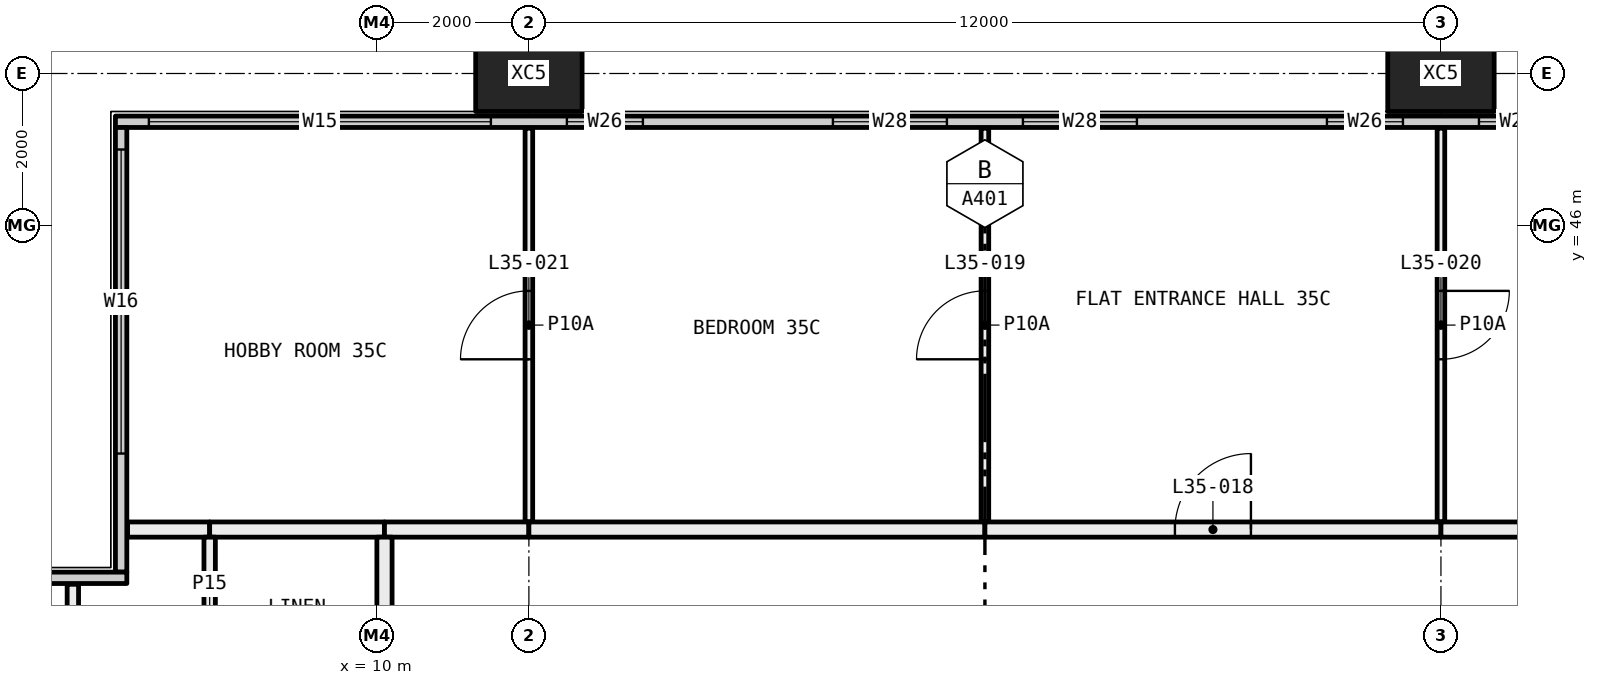
"""IFC4 building model, lengths in metres.
Left out: names, types, materials, properties, quantities, classifications, styles, units other than length and angle.
Written with IfcOpenShell. Run it as: python <this file> out.ifc"""

import sys

from ifc_helpers import new_model, si_unit, direction, frame, frame_2d, origin, origin_2d, place, context, subcontext, project, spatial, rectangle, hollow_rectangle, extrude, element, fill, save


model = new_model("IFC4")
c1 = context("Model", 3, precision=1e-05, world=origin(), true_north=direction((0.0, 1.0)))
c2 = subcontext(c1, "Body", "Model", "MODEL_VIEW")
j1 = project(units=[si_unit("LENGTHUNIT", "METRE"), si_unit("PLANEANGLEUNIT", "RADIAN")], contexts=[c1])
p1 = place(None, origin())
s1 = spatial("IfcSite", under=j1, at=p1, CompositionType="ELEMENT")
p2 = place(p1, origin())
s2 = spatial("IfcBuilding", under=s1, at=p2, CompositionType="ELEMENT")
p3 = place(p2, frame((0.0, 0.0, 134.55)))
s3 = spatial("IfcBuildingStorey", under=s2, at=p3, CompositionType="ELEMENT", Elevation=134.55)
for number, where, z_axis, x_axis in (
    (1, (12.0, 48.0, -0.4), (0.0, 0.0, 1.0), (1.0, 0.0, 0.0)),
    (2, (24.0, 48.0, -0.4), (0.0, 0.0, 1.0), (1.0, 0.0, 0.0)),
):
    element("IfcColumn", number, at=place(p3, frame(where, z_axis=z_axis, x_axis=x_axis)), inside=s3, PredefinedType="COLUMN", context=c2, shape_type="SweptSolid", body=[
        extrude(hollow_rectangle(XDim=1.4, YDim=1.0, WallThickness=0.055, at=origin_2d()), origin(), (0.0, 0.0, 1.0), 3.45),
    ])
p4 = place(p3, frame((6.56, 47.365, 0.0), z_axis=(0.0, 0.0, 1.0), x_axis=(1.0, 0.0, 0.0)))
e3 = element("IfcWall", 3, at=p4, inside=s3, PredefinedType="ELEMENTEDWALL", context=c2, shape_type="SweptSolid", body=[
    extrude(rectangle(XDim=58.88, YDim=0.15, at=frame_2d((29.44, 0.0))), origin(), (0.0, 0.0, 1.0), 3.05),
])
p5 = place(p4, frame((0.44, 0.0, 0.45)))
e4 = element("IfcOpeningElement", 4, at=p5, cuts=e3, PredefinedType="OPENING", context=c2, shape_type="SweptSolid", body=[
    extrude(rectangle(XDim=4.5, YDim=2.55, at=frame_2d((2.25, 1.275))), frame((0.0, 0.085, 0.0), z_axis=(0.0, -1.0, 0.0), x_axis=(1.0, 0.0, 0.0)), (0.0, 0.0, 1.0), 0.17),
])
p6 = place(p4, frame((5.94, 0.0, 0.45)))
e5 = element("IfcOpeningElement", 5, at=p6, cuts=e3, PredefinedType="OPENING", context=c2, shape_type="SweptSolid", body=[
    extrude(rectangle(XDim=1.0, YDim=2.55, at=frame_2d((0.5, 1.275))), frame((0.0, 0.085, 0.0), z_axis=(0.0, -1.0, 0.0), x_axis=(1.0, 0.0, 0.0)), (0.0, 0.0, 1.0), 0.17),
])
p7 = place(p4, frame((9.44, 0.0, 0.45)))
e6 = element("IfcOpeningElement", 6, at=p7, cuts=e3, PredefinedType="OPENING", context=c2, shape_type="SweptSolid", body=[
    extrude(rectangle(XDim=1.5, YDim=2.55, at=frame_2d((0.75, 1.275))), frame((0.0, 0.085, 0.0), z_axis=(0.0, -1.0, 0.0), x_axis=(1.0, 0.0, 0.0)), (0.0, 0.0, 1.0), 0.17),
])
p8 = place(p4, frame((11.94, 0.0, 0.45)))
e7 = element("IfcOpeningElement", 7, at=p8, cuts=e3, PredefinedType="OPENING", context=c2, shape_type="SweptSolid", body=[
    extrude(rectangle(XDim=1.5, YDim=2.55, at=frame_2d((0.75, 1.275))), frame((0.0, 0.085, 0.0), z_axis=(0.0, -1.0, 0.0), x_axis=(1.0, 0.0, 0.0)), (0.0, 0.0, 1.0), 0.17),
])
p9 = place(p4, frame((15.94, 0.0, 0.45)))
e8 = element("IfcOpeningElement", 8, at=p9, cuts=e3, PredefinedType="OPENING", context=c2, shape_type="SweptSolid", body=[
    extrude(rectangle(XDim=1.0, YDim=2.55, at=frame_2d((0.5, 1.275))), frame((0.0, 0.085, 0.0), z_axis=(0.0, -1.0, 0.0), x_axis=(1.0, 0.0, 0.0)), (0.0, 0.0, 1.0), 0.17),
])
p10 = place(p4, frame((17.94, 0.0, 0.45)))
e9 = element("IfcOpeningElement", 9, at=p10, cuts=e3, PredefinedType="OPENING", context=c2, shape_type="SweptSolid", body=[
    extrude(rectangle(XDim=1.0, YDim=2.55, at=frame_2d((0.5, 1.275))), frame((0.0, 0.085, 0.0), z_axis=(0.0, -1.0, 0.0), x_axis=(1.0, 0.0, 0.0)), (0.0, 0.0, 1.0), 0.17),
])
p11 = place(p4, frame((21.44, 0.0, 0.45)))
e10 = element("IfcOpeningElement", 10, at=p11, cuts=e3, PredefinedType="OPENING", context=c2, shape_type="SweptSolid", body=[
    extrude(rectangle(XDim=1.5, YDim=2.55, at=frame_2d((0.75, 1.275))), frame((0.0, 0.085, 0.0), z_axis=(0.0, -1.0, 0.0), x_axis=(1.0, 0.0, 0.0)), (0.0, 0.0, 1.0), 0.17),
])
p12 = place(p4, frame((23.94, 0.0, 0.45)))
e11 = element("IfcOpeningElement", 11, at=p12, cuts=e3, PredefinedType="OPENING", context=c2, shape_type="SweptSolid", body=[
    extrude(rectangle(XDim=1.5, YDim=2.55, at=frame_2d((0.75, 1.275))), frame((0.0, 0.085, 0.0), z_axis=(0.0, -1.0, 0.0), x_axis=(1.0, 0.0, 0.0)), (0.0, 0.0, 1.0), 0.17),
])
p13 = place(p4, frame((27.94, 0.0, 0.45)))
e12 = element("IfcOpeningElement", 12, at=p13, cuts=e3, PredefinedType="OPENING", context=c2, shape_type="SweptSolid", body=[
    extrude(rectangle(XDim=1.0, YDim=2.55, at=frame_2d((0.5, 1.275))), frame((0.0, 0.085, 0.0), z_axis=(0.0, -1.0, 0.0), x_axis=(1.0, 0.0, 0.0)), (0.0, 0.0, 1.0), 0.17),
])
p14 = place(p4, frame((29.94, 0.0, 0.45)))
e13 = element("IfcOpeningElement", 13, at=p14, cuts=e3, PredefinedType="OPENING", context=c2, shape_type="SweptSolid", body=[
    extrude(rectangle(XDim=1.0, YDim=2.55, at=frame_2d((0.5, 1.275))), frame((0.0, 0.085, 0.0), z_axis=(0.0, -1.0, 0.0), x_axis=(1.0, 0.0, 0.0)), (0.0, 0.0, 1.0), 0.17),
])
p15 = place(p4, frame((33.44, 0.0, 0.45)))
e14 = element("IfcOpeningElement", 14, at=p15, cuts=e3, PredefinedType="OPENING", context=c2, shape_type="SweptSolid", body=[
    extrude(rectangle(XDim=1.5, YDim=2.55, at=frame_2d((0.75, 1.275))), frame((0.0, 0.085, 0.0), z_axis=(0.0, -1.0, 0.0), x_axis=(1.0, 0.0, 0.0)), (0.0, 0.0, 1.0), 0.17),
])
p16 = place(p4, frame((35.94, 0.0, 0.45)))
e15 = element("IfcOpeningElement", 15, at=p16, cuts=e3, PredefinedType="OPENING", context=c2, shape_type="SweptSolid", body=[
    extrude(rectangle(XDim=1.5, YDim=2.55, at=frame_2d((0.75, 1.275))), frame((0.0, 0.085, 0.0), z_axis=(0.0, -1.0, 0.0), x_axis=(1.0, 0.0, 0.0)), (0.0, 0.0, 1.0), 0.17),
])
p17 = place(p4, frame((39.94, 0.0, 0.45)))
e16 = element("IfcOpeningElement", 16, at=p17, cuts=e3, PredefinedType="OPENING", context=c2, shape_type="SweptSolid", body=[
    extrude(rectangle(XDim=1.0, YDim=2.55, at=frame_2d((0.5, 1.275))), frame((0.0, 0.085, 0.0), z_axis=(0.0, -1.0, 0.0), x_axis=(1.0, 0.0, 0.0)), (0.0, 0.0, 1.0), 0.17),
])
p18 = place(p4, frame((41.94, 0.0, 0.45)))
e17 = element("IfcOpeningElement", 17, at=p18, cuts=e3, PredefinedType="OPENING", context=c2, shape_type="SweptSolid", body=[
    extrude(rectangle(XDim=1.0, YDim=2.55, at=frame_2d((0.5, 1.275))), frame((0.0, 0.085, 0.0), z_axis=(0.0, -1.0, 0.0), x_axis=(1.0, 0.0, 0.0)), (0.0, 0.0, 1.0), 0.17),
])
p19 = place(p4, frame((45.44, 0.0, 0.45)))
e18 = element("IfcOpeningElement", 18, at=p19, cuts=e3, PredefinedType="OPENING", context=c2, shape_type="SweptSolid", body=[
    extrude(rectangle(XDim=1.5, YDim=2.55, at=frame_2d((0.75, 1.275))), frame((0.0, 0.085, 0.0), z_axis=(0.0, -1.0, 0.0), x_axis=(1.0, 0.0, 0.0)), (0.0, 0.0, 1.0), 0.17),
])
p20 = place(p4, frame((47.94, 0.0, 0.45)))
e19 = element("IfcOpeningElement", 19, at=p20, cuts=e3, PredefinedType="OPENING", context=c2, shape_type="SweptSolid", body=[
    extrude(rectangle(XDim=1.5, YDim=2.55, at=frame_2d((0.75, 1.275))), frame((0.0, 0.085, 0.0), z_axis=(0.0, -1.0, 0.0), x_axis=(1.0, 0.0, 0.0)), (0.0, 0.0, 1.0), 0.17),
])
p21 = place(p4, frame((51.94, 0.0, 0.45)))
e20 = element("IfcOpeningElement", 20, at=p21, cuts=e3, PredefinedType="OPENING", context=c2, shape_type="SweptSolid", body=[
    extrude(rectangle(XDim=1.0, YDim=2.55, at=frame_2d((0.5, 1.275))), frame((0.0, 0.085, 0.0), z_axis=(0.0, -1.0, 0.0), x_axis=(1.0, 0.0, 0.0)), (0.0, 0.0, 1.0), 0.17),
])
p22 = place(p4, frame((53.94, 0.0, 0.45)))
e21 = element("IfcOpeningElement", 21, at=p22, cuts=e3, PredefinedType="OPENING", context=c2, shape_type="SweptSolid", body=[
    extrude(rectangle(XDim=4.5, YDim=2.55, at=frame_2d((2.25, 1.275))), frame((0.0, 0.085, 0.0), z_axis=(0.0, -1.0, 0.0), x_axis=(1.0, 0.0, 0.0)), (0.0, 0.0, 1.0), 0.17),
])
p23 = place(p3, frame((6.635, 41.44, 0.0), z_axis=(0.0, 0.0, 1.0), x_axis=(0.0, 1.0, 0.0)))
e22 = element("IfcWall", 22, at=p23, inside=s3, PredefinedType="ELEMENTEDWALL", context=c2, shape_type="SweptSolid", body=[
    extrude(rectangle(XDim=5.85, YDim=0.15, at=frame_2d((2.925, 0.0))), origin(), (0.0, 0.0, 1.0), 3.05),
])
p24 = place(p23, frame((1.56, 0.0, 0.45)))
e23 = element("IfcOpeningElement", 23, at=p24, cuts=e22, PredefinedType="OPENING", context=c2, shape_type="SweptSolid", body=[
    extrude(rectangle(XDim=4.0, YDim=2.55, at=frame_2d((2.0, 1.275))), frame((0.0, 0.085, 0.0), z_axis=(0.0, -1.0, 0.0), x_axis=(1.0, 0.0, 0.0)), (0.0, 0.0, 1.0), 0.17),
])
p25 = place(p3, frame((0.56, 41.365, 0.0), z_axis=(0.0, 0.0, 1.0), x_axis=(1.0, 0.0, 0.0)))
e24 = element("IfcWall", 24, at=p25, inside=s3, PredefinedType="ELEMENTEDWALL", context=c2, shape_type="SweptSolid", body=[
    extrude(rectangle(XDim=6.15, YDim=0.15, at=frame_2d((3.075, 0.0))), origin(), (0.0, 0.0, 1.0), 3.05),
])
p26 = place(p25, frame((0.44, 0.0, 0.45)))
e25 = element("IfcOpeningElement", 25, at=p26, cuts=e24, PredefinedType="OPENING", context=c2, shape_type="SweptSolid", body=[
    extrude(rectangle(XDim=4.0, YDim=2.55, at=frame_2d((2.0, 1.275))), frame((0.0, 0.085, 0.0), z_axis=(0.0, -1.0, 0.0), x_axis=(1.0, 0.0, 0.0)), (0.0, 0.0, 1.0), 0.17),
])
p27 = place(p3, frame((12.0, 42.1, 0.0), z_axis=(0.0, 0.0, 1.0), x_axis=(0.0, 1.0, 0.0)))
e26 = element("IfcWall", 26, at=p27, inside=s3, PredefinedType="PARTITIONING", context=c2, shape_type="SweptSolid", body=[
    extrude(rectangle(XDim=5.18, YDim=0.1, at=frame_2d((2.59, 0.0))), origin(), (0.0, 0.0, 1.0), 3.05),
])
p28 = place(p27, frame((2.14, 0.0, 0.0)))
e27 = element("IfcOpeningElement", 27, at=p28, cuts=e26, PredefinedType="OPENING", context=c2, shape_type="SweptSolid", body=[
    extrude(rectangle(XDim=0.9, YDim=2.1, at=frame_2d((0.45, 1.05))), frame((0.0, 0.06, 0.0), z_axis=(0.0, -1.0, 0.0), x_axis=(1.0, 0.0, 0.0)), (0.0, 0.0, 1.0), 0.12),
])
p29 = place(p3, frame((6.72, 42.0, 0.0), z_axis=(0.0, 0.0, 1.0), x_axis=(1.0, 0.0, 0.0)))
e28 = element("IfcWall", 28, at=p29, inside=s3, PredefinedType="PARTITIONING", context=c2, shape_type="SweptSolid", body=[
    extrude(rectangle(XDim=1.08, YDim=0.2, at=frame_2d((0.54, 0.0))), origin(), (0.0, 0.0, 1.0), 3.05),
])
p30 = place(p3, frame((7.8, 42.0, 0.0), z_axis=(0.0, 0.0, 1.0), x_axis=(1.0, 0.0, 0.0)))
e29 = element("IfcWall", 29, at=p30, inside=s3, PredefinedType="PARTITIONING", context=c2, shape_type="SweptSolid", body=[
    extrude(rectangle(XDim=2.3, YDim=0.2, at=frame_2d((1.15, 0.0))), origin(), (0.0, 0.0, 1.0), 3.05),
])
p31 = place(p3, frame((10.1, 42.0, 0.0), z_axis=(0.0, 0.0, 1.0), x_axis=(1.0, 0.0, 0.0)))
e30 = element("IfcWall", 30, at=p31, inside=s3, PredefinedType="PARTITIONING", context=c2, shape_type="SweptSolid", body=[
    extrude(rectangle(XDim=1.9, YDim=0.2, at=frame_2d((0.95, 0.0))), origin(), (0.0, 0.0, 1.0), 3.05),
])
p32 = place(p3, frame((18.0, 42.1, 0.0), z_axis=(0.0, 0.0, 1.0), x_axis=(0.0, 1.0, 0.0)))
e31 = element("IfcWall", 31, at=p32, inside=s3, PredefinedType="PARTITIONING", context=c2, shape_type="SweptSolid", body=[
    extrude(rectangle(XDim=5.18, YDim=0.1, at=frame_2d((2.59, 0.0))), origin(), (0.0, 0.0, 1.0), 3.05),
])
p33 = place(p32, frame((2.14, 0.0, 0.0)))
e32 = element("IfcOpeningElement", 32, at=p33, cuts=e31, PredefinedType="OPENING", context=c2, shape_type="SweptSolid", body=[
    extrude(rectangle(XDim=0.9, YDim=2.1, at=frame_2d((0.45, 1.05))), frame((0.0, 0.06, 0.0), z_axis=(0.0, -1.0, 0.0), x_axis=(1.0, 0.0, 0.0)), (0.0, 0.0, 1.0), 0.12),
])
p34 = place(p3, frame((12.0, 42.0, 0.0), z_axis=(0.0, 0.0, 1.0), x_axis=(1.0, 0.0, 0.0)))
e33 = element("IfcWall", 33, at=p34, inside=s3, PredefinedType="PARTITIONING", context=c2, shape_type="SweptSolid", body=[
    extrude(rectangle(XDim=6.0, YDim=0.2, at=frame_2d((3.0, 0.0))), origin(), (0.0, 0.0, 1.0), 3.05),
])
p35 = place(p3, frame((24.0, 42.1, 0.0), z_axis=(0.0, 0.0, 1.0), x_axis=(0.0, 1.0, 0.0)))
e34 = element("IfcWall", 34, at=p35, inside=s3, PredefinedType="PARTITIONING", context=c2, shape_type="SweptSolid", body=[
    extrude(rectangle(XDim=5.18, YDim=0.1, at=frame_2d((2.59, 0.0))), origin(), (0.0, 0.0, 1.0), 3.05),
])
p36 = place(p35, frame((2.14, 0.0, 0.0)))
e35 = element("IfcOpeningElement", 35, at=p36, cuts=e34, PredefinedType="OPENING", context=c2, shape_type="SweptSolid", body=[
    extrude(rectangle(XDim=0.9, YDim=2.1, at=frame_2d((0.45, 1.05))), frame((0.0, 0.06, 0.0), z_axis=(0.0, -1.0, 0.0), x_axis=(1.0, 0.0, 0.0)), (0.0, 0.0, 1.0), 0.12),
])
p37 = place(p3, frame((18.0, 42.0, 0.0), z_axis=(0.0, 0.0, 1.0), x_axis=(1.0, 0.0, 0.0)))
e36 = element("IfcWall", 36, at=p37, inside=s3, PredefinedType="PARTITIONING", context=c2, shape_type="SweptSolid", body=[
    extrude(rectangle(XDim=6.0, YDim=0.2, at=frame_2d((3.0, 0.0))), origin(), (0.0, 0.0, 1.0), 3.05),
])
p38 = place(p37, frame((2.5, 0.0, 0.0)))
e37 = element("IfcOpeningElement", 37, at=p38, cuts=e36, PredefinedType="OPENING", context=c2, shape_type="SweptSolid", body=[
    extrude(rectangle(XDim=1.0, YDim=2.1, at=frame_2d((0.5, 1.05))), frame((0.0, 0.11, 0.0), z_axis=(0.0, -1.0, 0.0), x_axis=(1.0, 0.0, 0.0)), (0.0, 0.0, 1.0), 0.22),
])
p39 = place(p3, frame((24.0, 42.0, 0.0), z_axis=(0.0, 0.0, 1.0), x_axis=(1.0, 0.0, 0.0)))
e38 = element("IfcWall", 38, at=p39, inside=s3, PredefinedType="PARTITIONING", context=c2, shape_type="SweptSolid", body=[
    extrude(rectangle(XDim=1.9, YDim=0.2, at=frame_2d((0.95, 0.0))), origin(), (0.0, 0.0, 1.0), 3.05),
])
p40 = place(p3, frame((6.0, 39.0, 0.0), z_axis=(0.0, 0.0, 1.0), x_axis=(0.0, 1.0, 0.0)))
e39 = element("IfcWall", 39, at=p40, inside=s3, PredefinedType="PARTITIONING", context=c2, shape_type="SweptSolid", body=[
    extrude(rectangle(XDim=2.28, YDim=0.15, at=frame_2d((1.14, 0.0))), origin(), (0.0, 0.0, 1.0), 3.05),
])
p41 = place(p40, frame((0.69, 0.0, 0.0)))
e40 = element("IfcOpeningElement", 40, at=p41, cuts=e39, PredefinedType="OPENING", context=c2, shape_type="SweptSolid", body=[
    extrude(rectangle(XDim=0.9, YDim=2.1, at=frame_2d((0.45, 1.05))), frame((0.0, 0.085, 0.0), z_axis=(0.0, -1.0, 0.0), x_axis=(1.0, 0.0, 0.0)), (0.0, 0.0, 1.0), 0.17),
])
p42 = place(p3, frame((7.8, 39.075, 0.0), z_axis=(0.0, 0.0, 1.0), x_axis=(0.0, 1.0, 0.0)))
e41 = element("IfcWall", 41, at=p42, inside=s3, PredefinedType="PARTITIONING", context=c2, shape_type="SweptSolid", body=[
    extrude(rectangle(XDim=2.825, YDim=0.15, at=frame_2d((1.413, 0.0))), origin(), (0.0, 0.0, 1.0), 3.05),
])
p43 = place(p3, frame((10.1, 39.0, 0.0), z_axis=(0.0, 0.0, 1.0), x_axis=(0.0, 1.0, 0.0)))
e42 = element("IfcWall", 42, at=p43, inside=s3, PredefinedType="PARTITIONING", context=c2, shape_type="SweptSolid", body=[
    extrude(rectangle(XDim=2.9, YDim=0.2, at=frame_2d((1.45, 0.0))), origin(), (0.0, 0.0, 1.0), 3.05),
])
p44 = place(p5, origin())
e43 = element("IfcWindow", 43, at=p44, inside=s3, PartitioningType="SINGLE_PANEL", PredefinedType="WINDOW", context=c2, shape_type="SweptSolid", body=[
    extrude(rectangle(XDim=4.5, YDim=2.55, at=frame_2d((2.25, 1.275))), frame((0.0, 0.03, 0.0), z_axis=(0.0, -1.0, 0.0), x_axis=(1.0, 0.0, 0.0)), (0.0, 0.0, 1.0), 0.06),
])
fill(e4, e43)
p45 = place(p6, origin())
e44 = element("IfcWindow", 44, at=p45, inside=s3, PartitioningType="SINGLE_PANEL", PredefinedType="WINDOW", context=c2, shape_type="SweptSolid", body=[
    extrude(rectangle(XDim=1.0, YDim=2.55, at=frame_2d((0.5, 1.275))), frame((0.0, 0.03, 0.0), z_axis=(0.0, -1.0, 0.0), x_axis=(1.0, 0.0, 0.0)), (0.0, 0.0, 1.0), 0.06),
])
fill(e5, e44)
p46 = place(p7, origin())
e45 = element("IfcWindow", 45, at=p46, inside=s3, PartitioningType="SINGLE_PANEL", PredefinedType="WINDOW", context=c2, shape_type="SweptSolid", body=[
    extrude(rectangle(XDim=1.5, YDim=2.55, at=frame_2d((0.75, 1.275))), frame((0.0, 0.03, 0.0), z_axis=(0.0, -1.0, 0.0), x_axis=(1.0, 0.0, 0.0)), (0.0, 0.0, 1.0), 0.06),
])
fill(e6, e45)
p47 = place(p8, origin())
e46 = element("IfcWindow", 46, at=p47, inside=s3, PartitioningType="SINGLE_PANEL", PredefinedType="WINDOW", context=c2, shape_type="SweptSolid", body=[
    extrude(rectangle(XDim=1.5, YDim=2.55, at=frame_2d((0.75, 1.275))), frame((0.0, 0.03, 0.0), z_axis=(0.0, -1.0, 0.0), x_axis=(1.0, 0.0, 0.0)), (0.0, 0.0, 1.0), 0.06),
])
fill(e7, e46)
p48 = place(p9, origin())
e47 = element("IfcWindow", 47, at=p48, inside=s3, PartitioningType="SINGLE_PANEL", PredefinedType="WINDOW", context=c2, shape_type="SweptSolid", body=[
    extrude(rectangle(XDim=1.0, YDim=2.55, at=frame_2d((0.5, 1.275))), frame((0.0, 0.03, 0.0), z_axis=(0.0, -1.0, 0.0), x_axis=(1.0, 0.0, 0.0)), (0.0, 0.0, 1.0), 0.06),
])
fill(e8, e47)
p49 = place(p10, origin())
e48 = element("IfcWindow", 48, at=p49, inside=s3, PartitioningType="SINGLE_PANEL", PredefinedType="WINDOW", context=c2, shape_type="SweptSolid", body=[
    extrude(rectangle(XDim=1.0, YDim=2.55, at=frame_2d((0.5, 1.275))), frame((0.0, 0.03, 0.0), z_axis=(0.0, -1.0, 0.0), x_axis=(1.0, 0.0, 0.0)), (0.0, 0.0, 1.0), 0.06),
])
fill(e9, e48)
p50 = place(p24, origin())
e49 = element("IfcWindow", 49, at=p50, inside=s3, PartitioningType="SINGLE_PANEL", PredefinedType="WINDOW", context=c2, shape_type="SweptSolid", body=[
    extrude(rectangle(XDim=4.0, YDim=2.55, at=frame_2d((2.0, 1.275))), frame((0.0, 0.03, 0.0), z_axis=(0.0, -1.0, 0.0), x_axis=(1.0, 0.0, 0.0)), (0.0, 0.0, 1.0), 0.06),
])
fill(e23, e49)
p51 = place(p38, origin())
e50 = element("IfcDoor", 50, at=p51, inside=s3, OperationType="SINGLE_SWING_LEFT", PredefinedType="DOOR", context=c2, shape_type="SweptSolid", body=[
    extrude(rectangle(XDim=1.0, YDim=2.1, at=frame_2d((0.5, 1.05))), frame((0.0, 0.025, 0.0), z_axis=(0.0, -1.0, 0.0), x_axis=(1.0, 0.0, 0.0)), (0.0, 0.0, 1.0), 0.05),
])
fill(e37, e50)
p52 = place(p33, origin())
e51 = element("IfcDoor", 51, at=p52, inside=s3, OperationType="SINGLE_SWING_RIGHT", PredefinedType="DOOR", context=c2, shape_type="SweptSolid", body=[
    extrude(rectangle(XDim=0.9, YDim=2.1, at=frame_2d((0.45, 1.05))), frame((0.0, 0.025, 0.0), z_axis=(0.0, -1.0, 0.0), x_axis=(1.0, 0.0, 0.0)), (0.0, 0.0, 1.0), 0.05),
])
fill(e32, e51)
p53 = place(p36, frame((0.9, 0.0, 0.0), x_axis=(-1.0, 0.0, 0.0)))
e52 = element("IfcDoor", 52, at=p53, inside=s3, OperationType="SINGLE_SWING_RIGHT", PredefinedType="DOOR", context=c2, shape_type="SweptSolid", body=[
    extrude(rectangle(XDim=0.9, YDim=2.1, at=frame_2d((0.45, 1.05))), frame((0.0, 0.025, 0.0), z_axis=(0.0, -1.0, 0.0), x_axis=(1.0, 0.0, 0.0)), (0.0, 0.0, 1.0), 0.05),
])
fill(e35, e52)
p54 = place(p28, origin())
e53 = element("IfcDoor", 53, at=p54, inside=s3, OperationType="SINGLE_SWING_RIGHT", PredefinedType="DOOR", context=c2, shape_type="SweptSolid", body=[
    extrude(rectangle(XDim=0.9, YDim=2.1, at=frame_2d((0.45, 1.05))), frame((0.0, 0.025, 0.0), z_axis=(0.0, -1.0, 0.0), x_axis=(1.0, 0.0, 0.0)), (0.0, 0.0, 1.0), 0.05),
])
fill(e27, e53)
save(model, sys.argv[1])
